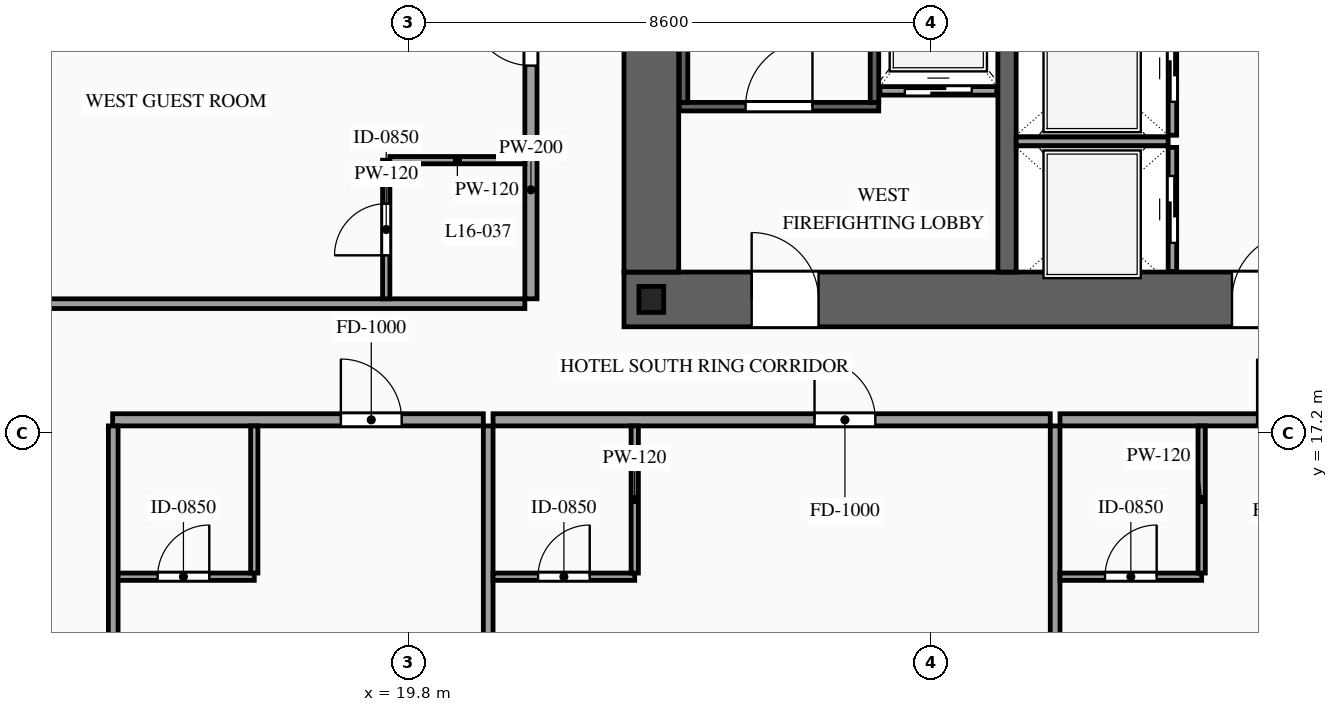
"""IFC4 building model, lengths in metres.
Left out: names, types, materials, properties, quantities, classifications, styles, units other than length and angle.
Written with IfcOpenShell. Run it as: python <this file> out.ifc"""

import sys

from ifc_helpers import new_model, si_unit, direction, frame, frame_2d, origin, origin_2d, place, context, subcontext, project, spatial, rectangle, i_section, extrude, source, transform, mapped, element, fill, save


model = new_model("IFC4")
c1 = context("Model", 3, precision=1e-05, world=origin(), true_north=direction((0.0, 1.0)))
c2 = subcontext(c1, "Body", "Model", "MODEL_VIEW")
j1 = project(units=[si_unit("LENGTHUNIT", "METRE"), si_unit("PLANEANGLEUNIT", "RADIAN")], contexts=[c1])
p1 = place(None, origin())
s1 = spatial("IfcSite", under=j1, at=p1, CompositionType="ELEMENT")
p2 = place(p1, origin())
s2 = spatial("IfcBuilding", under=s1, at=p2, CompositionType="ELEMENT")
p3 = place(p2, frame((0.0, 0.0, 64.0)))
s3 = spatial("IfcBuildingStorey", under=s2, at=p3, CompositionType="ELEMENT", Elevation=64.0)
p4 = place(p3, frame((23.35, 19.4, 0.0), z_axis=(0.0, 0.0, 1.0), x_axis=(1.0, 0.0, 0.0)))
e1 = element("IfcWall", 1, at=p4, inside=s3, PredefinedType="SHEAR", context=c2, shape_type="SweptSolid", body=[
    extrude(rectangle(XDim=27.3, YDim=0.9, at=frame_2d((13.65, 0.0))), origin(), (0.0, 0.0, 1.0), 3.6),
])
p5 = place(p4, frame((2.1, 0.0, 0.0)))
e2 = element("IfcOpeningElement", 2, at=p5, cuts=e1, PredefinedType="OPENING", context=c2, shape_type="SweptSolid", body=[
    extrude(rectangle(XDim=1.1, YDim=2.2, at=frame_2d((0.55, 1.1))), frame((0.0, 0.465, 0.0), z_axis=(0.0, -1.0, 0.0), x_axis=(1.0, 0.0, 0.0)), (0.0, 0.0, 1.0), 0.93),
])
p6 = place(p4, frame((10.0, 0.0, 0.0)))
e3 = element("IfcOpeningElement", 3, at=p6, cuts=e1, PredefinedType="OPENING", context=c2, shape_type="SweptSolid", body=[
    extrude(rectangle(XDim=1.1, YDim=2.2, at=frame_2d((0.55, 1.1))), frame((0.0, 0.465, 0.0), z_axis=(0.0, -1.0, 0.0), x_axis=(1.0, 0.0, 0.0)), (0.0, 0.0, 1.0), 0.93),
])
p7 = place(p4, frame((23.2, 0.0, 0.0)))
e4 = element("IfcOpeningElement", 4, at=p7, cuts=e1, PredefinedType="OPENING", context=c2, shape_type="SweptSolid", body=[
    extrude(rectangle(XDim=1.1, YDim=2.2, at=frame_2d((0.55, 1.1))), frame((0.0, 0.465, 0.0), z_axis=(0.0, -1.0, 0.0), x_axis=(1.0, 0.0, 0.0)), (0.0, 0.0, 1.0), 0.93),
])
p8 = place(p4, frame((19.82, 0.0, 0.0)))
e5 = element("IfcOpeningElement", 5, at=p8, cuts=e1, PredefinedType="OPENING", context=c2, shape_type="SweptSolid", body=[
    extrude(rectangle(XDim=0.9, YDim=2.15, at=frame_2d((0.45, 1.075))), frame((0.0, 0.465, 0.0), z_axis=(0.0, -1.0, 0.0), x_axis=(1.0, 0.0, 0.0)), (0.0, 0.0, 1.0), 0.93),
])
p9 = place(p4, frame((18.38, 0.0, 0.0)))
e6 = element("IfcOpeningElement", 6, at=p9, cuts=e1, PredefinedType="OPENING", context=c2, shape_type="SweptSolid", body=[
    extrude(rectangle(XDim=0.9, YDim=2.15, at=frame_2d((0.45, 1.075))), frame((0.0, 0.465, 0.0), z_axis=(0.0, -1.0, 0.0), x_axis=(1.0, 0.0, 0.0)), (0.0, 0.0, 1.0), 0.93),
])
m1 = source(origin(), c2, "Body", "SweptSolid", [
    extrude(rectangle(XDim=11.9, YDim=0.9, at=frame_2d((5.95, 0.0))), origin(), (0.0, 0.0, 1.0), 3.6),
])
p10 = place(p3, frame((23.8, 19.85, 0.0), z_axis=(0.0, 0.0, 1.0), x_axis=(0.0, 1.0, 0.0)))
e7 = element("IfcWall", 7, at=p10, inside=s3, PredefinedType="SHEAR", context=c2, shape_type="MappedRepresentation", body=[
    mapped(m1, transform((0.0, 0.0, 0.0), scale=1.0)),
])
m2 = source(origin(), c2, "Body", "SweptSolid", [
    extrude(rectangle(XDim=11.9, YDim=0.3, at=frame_2d((5.95, 0.0))), origin(), (0.0, 0.0, 1.0), 3.6),
])
p11 = place(p3, frame((29.65, 19.85, 0.0), z_axis=(0.0, 0.0, 1.0), x_axis=(0.0, 1.0, 0.0)))
e8 = element("IfcWall", 8, at=p11, inside=s3, PredefinedType="SOLIDWALL", context=c2, shape_type="MappedRepresentation", body=[
    mapped(m2, transform((0.0, 0.0, 0.0), scale=1.0)),
])
m3 = source(origin(), c2, "Body", "SweptSolid", [
    extrude(i_section(OverallWidth=0.407, OverallDepth=0.428, WebThickness=0.02, FlangeThickness=0.035, at=origin_2d()), origin(), (0.0, 0.0, 1.0), 3.6),
])
p12 = place(p3, frame((23.8, 19.4, 0.0), z_axis=(0.0, 0.0, 1.0), x_axis=(1.0, 0.0, 0.0)))
e9 = element("IfcColumn", 9, at=p12, inside=s3, PredefinedType="COLUMN", context=c2, shape_type="MappedRepresentation", body=[
    mapped(m3, transform((0.0, 0.0, 0.0), scale=1.0)),
])
p13 = place(p3, frame((27.56, 22.83, 0.0), z_axis=(0.0, 0.0, 1.0), x_axis=(1.0, 0.0, 0.0)))
e10 = element("IfcWall", 10, at=p13, inside=s3, PredefinedType="SOLIDWALL", context=c2, shape_type="SweptSolid", body=[
    extrude(rectangle(XDim=1.92, YDim=0.14, at=frame_2d((0.96, 0.0))), origin(), (0.0, 0.0, 1.0), 3.38),
])
p14 = place(p13, frame((0.41, 0.0, 0.0)))
e11 = element("IfcOpeningElement", 11, at=p14, cuts=e10, PredefinedType="OPENING", context=c2, shape_type="SweptSolid", body=[
    extrude(rectangle(XDim=1.1, YDim=2.2, at=frame_2d((0.55, 1.1))), frame((0.0, 0.085, 0.0), z_axis=(0.0, -1.0, 0.0), x_axis=(1.0, 0.0, 0.0)), (0.0, 0.0, 1.0), 0.17),
])
p15 = place(p3, frame((32.37, 19.86, 0.0), z_axis=(0.0, 0.0, 1.0), x_axis=(0.0, 1.0, 0.0)))
e12 = element("IfcWall", 12, at=p15, inside=s3, PredefinedType="SOLIDWALL", context=c2, shape_type="SweptSolid", body=[
    extrude(rectangle(XDim=2.04, YDim=0.14, at=frame_2d((1.02, 0.0))), origin(), (0.0, 0.0, 1.0), 3.38),
])
p16 = place(p15, frame((0.47, 0.0, 0.0)))
e13 = element("IfcOpeningElement", 13, at=p16, cuts=e12, PredefinedType="OPENING", context=c2, shape_type="SweptSolid", body=[
    extrude(rectangle(XDim=1.1, YDim=2.2, at=frame_2d((0.55, 1.1))), frame((0.0, 0.085, 0.0), z_axis=(0.0, -1.0, 0.0), x_axis=(1.0, 0.0, 0.0)), (0.0, 0.0, 1.0), 0.17),
])
m4 = source(origin(), c2, "Body", "SweptSolid", [
    extrude(rectangle(XDim=2.5, YDim=0.14, at=frame_2d((1.25, 0.0))), origin(), (0.0, 0.0, 1.0), 3.38),
])
p17 = place(p3, frame((29.8, 22.0, 0.0), z_axis=(0.0, 0.0, 1.0), x_axis=(1.0, 0.0, 0.0)))
e14 = element("IfcWall", 14, at=p17, inside=s3, PredefinedType="SOLIDWALL", context=c2, shape_type="MappedRepresentation", body=[
    mapped(m4, transform((0.0, 0.0, 0.0), scale=1.0)),
])
p18 = place(p3, frame((32.37, 22.1, 0.0), z_axis=(0.0, 0.0, 1.0), x_axis=(0.0, 1.0, 0.0)))
e15 = element("IfcWall", 15, at=p18, inside=s3, PredefinedType="SOLIDWALL", context=c2, shape_type="SweptSolid", body=[
    extrude(rectangle(XDim=2.2, YDim=0.14, at=frame_2d((1.1, 0.0))), origin(), (0.0, 0.0, 1.0), 3.38),
])
p19 = place(p18, frame((0.55, 0.0, 0.0)))
e16 = element("IfcOpeningElement", 16, at=p19, cuts=e15, PredefinedType="OPENING", context=c2, shape_type="SweptSolid", body=[
    extrude(rectangle(XDim=1.1, YDim=2.2, at=frame_2d((0.55, 1.1))), frame((0.0, 0.085, 0.0), z_axis=(0.0, -1.0, 0.0), x_axis=(1.0, 0.0, 0.0)), (0.0, 0.0, 1.0), 0.17),
])
p20 = place(p3, frame((24.26, 22.57, 0.0), z_axis=(0.0, 0.0, 1.0), x_axis=(1.0, 0.0, 0.0)))
e17 = element("IfcWall", 17, at=p20, inside=s3, PredefinedType="SOLIDWALL", context=c2, shape_type="SweptSolid", body=[
    extrude(rectangle(XDim=3.28, YDim=0.14, at=frame_2d((1.64, 0.0))), origin(), (0.0, 0.0, 1.0), 3.38),
])
p21 = place(p20, frame((1.09, 0.0, 0.0)))
e18 = element("IfcOpeningElement", 18, at=p21, cuts=e17, PredefinedType="OPENING", context=c2, shape_type="SweptSolid", body=[
    extrude(rectangle(XDim=1.1, YDim=2.2, at=frame_2d((0.55, 1.1))), frame((0.0, 0.085, 0.0), z_axis=(0.0, -1.0, 0.0), x_axis=(1.0, 0.0, 0.0)), (0.0, 0.0, 1.0), 0.17),
])
m5 = source(origin(), c2, "Body", "SweptSolid", [
    extrude(rectangle(XDim=8.94, YDim=0.14, at=frame_2d((4.47, 0.0))), origin(), (0.0, 0.0, 1.0), 3.38),
])
for number, where, z_axis, x_axis in (
    (19, (24.33, 22.64, 0.0), (0.0, 0.0, 1.0), (0.0, 1.0, 0.0)),
    (20, (27.47, 22.64, 0.0), (0.0, 0.0, 1.0), (0.0, 1.0, 0.0)),
):
    element("IfcWall", number, at=place(p3, frame(where, z_axis=z_axis, x_axis=x_axis)), inside=s3, PredefinedType="SOLIDWALL", context=c2, shape_type="MappedRepresentation", body=[
        mapped(m5, transform((0.0, 0.0, 0.0), scale=1.0)),
    ])
p22 = place(p3, frame((14.94, 17.42, 0.0), z_axis=(0.0, 0.0, 1.0), x_axis=(1.0, 0.0, 0.0)))
e21 = element("IfcWall", 21, at=p22, inside=s3, PredefinedType="PARTITIONING", context=c2, shape_type="SweptSolid", body=[
    extrude(rectangle(XDim=6.097, YDim=0.2, at=frame_2d((3.049, 0.0))), origin(), (0.0, 0.0, 1.0), 3.38),
])
p23 = place(p22, frame((3.754, 0.0, 0.0)))
e22 = element("IfcOpeningElement", 22, at=p23, cuts=e21, PredefinedType="OPENING", context=c2, shape_type="SweptSolid", body=[
    extrude(rectangle(XDim=1.0, YDim=2.2, at=frame_2d((0.5, 1.1))), frame((0.0, 0.115, 0.0), z_axis=(0.0, -1.0, 0.0), x_axis=(1.0, 0.0, 0.0)), (0.0, 0.0, 1.0), 0.23),
])
m6 = source(origin(), c2, "Body", "SweptSolid", [
    extrude(rectangle(XDim=16.47, YDim=0.16, at=frame_2d((8.235, 0.0))), origin(), (0.0, 0.0, 1.0), 3.38),
])
p24 = place(p3, frame((21.117, 0.85, 0.0), z_axis=(0.0, 0.0, 1.0), x_axis=(0.0, 1.0, 0.0)))
e23 = element("IfcWall", 23, at=p24, inside=s3, PredefinedType="PARTITIONING", context=c2, shape_type="MappedRepresentation", body=[
    mapped(m6, transform((0.0, 0.0, 0.0), scale=1.0)),
])
p25 = place(p3, frame((14.94, 14.84, 0.0), z_axis=(0.0, 0.0, 1.0), x_axis=(1.0, 0.0, 0.0)))
e24 = element("IfcWall", 24, at=p25, inside=s3, PredefinedType="PARTITIONING", context=c2, shape_type="SweptSolid", body=[
    extrude(rectangle(XDim=2.33, YDim=0.12, at=frame_2d((1.165, 0.0))), origin(), (0.0, 0.0, 1.0), 3.38),
])
p26 = place(p25, frame((0.74, 0.0, 0.0)))
e25 = element("IfcOpeningElement", 25, at=p26, cuts=e24, PredefinedType="OPENING", context=c2, shape_type="SweptSolid", body=[
    extrude(rectangle(XDim=0.85, YDim=2.1, at=frame_2d((0.425, 1.05))), frame((0.0, 0.075, 0.0), z_axis=(0.0, -1.0, 0.0), x_axis=(1.0, 0.0, 0.0)), (0.0, 0.0, 1.0), 0.15),
])
m7 = source(origin(), c2, "Body", "SweptSolid", [
    extrude(rectangle(XDim=2.42, YDim=0.12, at=frame_2d((1.21, 0.0))), origin(), (0.0, 0.0, 1.0), 3.38),
])
p27 = place(p3, frame((17.27, 14.9, 0.0), z_axis=(0.0, 0.0, 1.0), x_axis=(0.0, 1.0, 0.0)))
e26 = element("IfcWall", 26, at=p27, inside=s3, PredefinedType="PARTITIONING", context=c2, shape_type="MappedRepresentation", body=[
    mapped(m7, transform((0.0, 0.0, 0.0), scale=1.0)),
])
p28 = place(p3, frame((21.197, 17.42, 0.0), z_axis=(0.0, 0.0, 1.0), x_axis=(1.0, 0.0, 0.0)))
e27 = element("IfcWall", 27, at=p28, inside=s3, PredefinedType="PARTITIONING", context=c2, shape_type="SweptSolid", body=[
    extrude(rectangle(XDim=9.164, YDim=0.2, at=frame_2d((4.582, 0.0))), origin(), (0.0, 0.0, 1.0), 3.38),
])
p29 = place(p28, frame((5.287, 0.0, 0.0)))
e28 = element("IfcOpeningElement", 28, at=p29, cuts=e27, PredefinedType="OPENING", context=c2, shape_type="SweptSolid", body=[
    extrude(rectangle(XDim=1.0, YDim=2.2, at=frame_2d((0.5, 1.1))), frame((0.0, 0.115, 0.0), z_axis=(0.0, -1.0, 0.0), x_axis=(1.0, 0.0, 0.0)), (0.0, 0.0, 1.0), 0.23),
])
p30 = place(p3, frame((30.441, 0.85, 0.0), z_axis=(0.0, 0.0, 1.0), x_axis=(0.0, 1.0, 0.0)))
e29 = element("IfcWall", 29, at=p30, inside=s3, PredefinedType="PARTITIONING", context=c2, shape_type="MappedRepresentation", body=[
    mapped(m6, transform((0.0, 0.0, 0.0), scale=1.0)),
])
p31 = place(p3, frame((21.197, 14.84, 0.0), z_axis=(0.0, 0.0, 1.0), x_axis=(1.0, 0.0, 0.0)))
e30 = element("IfcWall", 30, at=p31, inside=s3, PredefinedType="PARTITIONING", context=c2, shape_type="SweptSolid", body=[
    extrude(rectangle(XDim=2.33, YDim=0.12, at=frame_2d((1.165, 0.0))), origin(), (0.0, 0.0, 1.0), 3.38),
])
p32 = place(p31, frame((0.74, 0.0, 0.0)))
e31 = element("IfcOpeningElement", 31, at=p32, cuts=e30, PredefinedType="OPENING", context=c2, shape_type="SweptSolid", body=[
    extrude(rectangle(XDim=0.85, YDim=2.1, at=frame_2d((0.425, 1.05))), frame((0.0, 0.075, 0.0), z_axis=(0.0, -1.0, 0.0), x_axis=(1.0, 0.0, 0.0)), (0.0, 0.0, 1.0), 0.15),
])
p33 = place(p3, frame((23.527, 14.9, 0.0), z_axis=(0.0, 0.0, 1.0), x_axis=(0.0, 1.0, 0.0)))
e32 = element("IfcWall", 32, at=p33, inside=s3, PredefinedType="PARTITIONING", context=c2, shape_type="MappedRepresentation", body=[
    mapped(m7, transform((0.0, 0.0, 0.0), scale=1.0)),
])
p34 = place(p3, frame((30.521, 17.42, 0.0), z_axis=(0.0, 0.0, 1.0), x_axis=(1.0, 0.0, 0.0)))
e33 = element("IfcWall", 33, at=p34, inside=s3, PredefinedType="PARTITIONING", context=c2, shape_type="SweptSolid", body=[
    extrude(rectangle(XDim=5.075, YDim=0.2, at=frame_2d((2.538, 0.0))), origin(), (0.0, 0.0, 1.0), 3.38),
])
p35 = place(p34, frame((3.242, 0.0, 0.0)))
e34 = element("IfcOpeningElement", 34, at=p35, cuts=e33, PredefinedType="OPENING", context=c2, shape_type="SweptSolid", body=[
    extrude(rectangle(XDim=1.0, YDim=2.2, at=frame_2d((0.5, 1.1))), frame((0.0, 0.115, 0.0), z_axis=(0.0, -1.0, 0.0), x_axis=(1.0, 0.0, 0.0)), (0.0, 0.0, 1.0), 0.23),
])
p36 = place(p3, frame((30.521, 14.84, 0.0), z_axis=(0.0, 0.0, 1.0), x_axis=(1.0, 0.0, 0.0)))
e35 = element("IfcWall", 35, at=p36, inside=s3, PredefinedType="PARTITIONING", context=c2, shape_type="SweptSolid", body=[
    extrude(rectangle(XDim=2.33, YDim=0.12, at=frame_2d((1.165, 0.0))), origin(), (0.0, 0.0, 1.0), 3.38),
])
p37 = place(p36, frame((0.74, 0.0, 0.0)))
e36 = element("IfcOpeningElement", 36, at=p37, cuts=e35, PredefinedType="OPENING", context=c2, shape_type="SweptSolid", body=[
    extrude(rectangle(XDim=0.85, YDim=2.1, at=frame_2d((0.425, 1.05))), frame((0.0, 0.075, 0.0), z_axis=(0.0, -1.0, 0.0), x_axis=(1.0, 0.0, 0.0)), (0.0, 0.0, 1.0), 0.15),
])
p38 = place(p3, frame((32.851, 14.9, 0.0), z_axis=(0.0, 0.0, 1.0), x_axis=(0.0, 1.0, 0.0)))
e37 = element("IfcWall", 37, at=p38, inside=s3, PredefinedType="PARTITIONING", context=c2, shape_type="MappedRepresentation", body=[
    mapped(m7, transform((0.0, 0.0, 0.0), scale=1.0)),
])
m8 = source(origin(), c2, "Body", "SweptSolid", [
    extrude(rectangle(XDim=16.32, YDim=0.16, at=frame_2d((8.16, 0.0))), origin(), (0.0, 0.0, 1.0), 3.38),
])
p39 = place(p3, frame((14.95, 1.0, 0.0), z_axis=(0.0, 0.0, 1.0), x_axis=(0.0, 1.0, 0.0)))
e38 = element("IfcWall", 38, at=p39, inside=s3, PredefinedType="PARTITIONING", context=c2, shape_type="MappedRepresentation", body=[
    mapped(m8, transform((0.0, 0.0, 0.0), scale=1.0)),
])
p40 = place(p3, frame((21.82, 19.41, 0.0), z_axis=(0.0, 0.0, 1.0), x_axis=(0.0, 1.0, 0.0)))
e39 = element("IfcWall", 39, at=p40, inside=s3, PredefinedType="PARTITIONING", context=c2, shape_type="SweptSolid", body=[
    extrude(rectangle(XDim=6.31, YDim=0.2, at=frame_2d((3.155, 0.0))), origin(), (0.0, 0.0, 1.0), 3.38),
])
p41 = place(p40, frame((3.835, 0.0, 0.0)))
e40 = element("IfcOpeningElement", 40, at=p41, cuts=e39, PredefinedType="OPENING", context=c2, shape_type="SweptSolid", body=[
    extrude(rectangle(XDim=1.0, YDim=2.2, at=frame_2d((0.5, 1.1))), frame((0.0, 0.115, 0.0), z_axis=(0.0, -1.0, 0.0), x_axis=(1.0, 0.0, 0.0)), (0.0, 0.0, 1.0), 0.23),
])
m9 = source(origin(), c2, "Body", "SweptSolid", [
    extrude(rectangle(XDim=9.67, YDim=0.16, at=frame_2d((4.835, 0.0))), origin(), (0.0, 0.0, 1.0), 2.875),
])
p42 = place(p3, frame((12.05, 19.33, 0.0), z_axis=(0.0, 0.0, 1.0), x_axis=(1.0, 0.0, 0.0)))
e41 = element("IfcWall", 41, at=p42, inside=s3, PredefinedType="PARTITIONING", context=c2, shape_type="MappedRepresentation", body=[
    mapped(m9, transform((0.0, 0.0, 0.0), scale=1.0)),
])
p43 = place(p3, frame((19.44, 19.41, 0.0), z_axis=(0.0, 0.0, 1.0), x_axis=(0.0, 1.0, 0.0)))
e42 = element("IfcWall", 42, at=p43, inside=s3, PredefinedType="PARTITIONING", context=c2, shape_type="SweptSolid", body=[
    extrude(rectangle(XDim=2.28, YDim=0.12, at=frame_2d((1.14, 0.0))), origin(), (0.0, 0.0, 1.0), 3.38),
])
p44 = place(p43, frame((0.715, 0.0, 0.0)))
e43 = element("IfcOpeningElement", 43, at=p44, cuts=e42, PredefinedType="OPENING", context=c2, shape_type="SweptSolid", body=[
    extrude(rectangle(XDim=0.85, YDim=2.1, at=frame_2d((0.425, 1.05))), frame((0.0, 0.075, 0.0), z_axis=(0.0, -1.0, 0.0), x_axis=(1.0, 0.0, 0.0)), (0.0, 0.0, 1.0), 0.15),
])
m10 = source(origin(), c2, "Body", "SweptSolid", [
    extrude(rectangle(XDim=2.22, YDim=0.12, at=frame_2d((1.11, 0.0))), origin(), (0.0, 0.0, 1.0), 3.38),
])
p45 = place(p3, frame((19.5, 21.69, 0.0), z_axis=(0.0, 0.0, 1.0), x_axis=(1.0, 0.0, 0.0)))
e44 = element("IfcWall", 44, at=p45, inside=s3, PredefinedType="PARTITIONING", context=c2, shape_type="MappedRepresentation", body=[
    mapped(m10, transform((0.0, 0.0, 0.0), scale=1.0)),
])
m11 = source(origin(), c2, "Body", "SweptSolid", [
    extrude(rectangle(XDim=1.1, YDim=2.2, at=frame_2d((0.55, 1.1))), frame((0.0, 0.025, 0.0), z_axis=(0.0, -1.0, 0.0), x_axis=(1.0, 0.0, 0.0)), (0.0, 0.0, 1.0), 0.05),
])
p46 = place(p14, origin())
e45 = element("IfcDoor", 45, at=p46, inside=s3, OperationType="SLIDING_TO_LEFT", PredefinedType="DOOR", context=c2, shape_type="MappedRepresentation", body=[
    mapped(m11, transform((0.0, 0.0, 0.0), scale=1.0)),
])
fill(e11, e45)
p47 = place(p16, origin())
e46 = element("IfcDoor", 46, at=p47, inside=s3, OperationType="SLIDING_TO_LEFT", PredefinedType="DOOR", context=c2, shape_type="MappedRepresentation", body=[
    mapped(m11, transform((0.0, 0.0, 0.0), scale=1.0)),
])
fill(e13, e46)
p48 = place(p19, origin())
e47 = element("IfcDoor", 47, at=p48, inside=s3, OperationType="SLIDING_TO_RIGHT", PredefinedType="DOOR", context=c2, shape_type="MappedRepresentation", body=[
    mapped(m11, transform((0.0, 0.0, 0.0), scale=1.0)),
])
fill(e16, e47)
m12 = source(origin(), c2, "Body", "SweptSolid", [
    extrude(rectangle(XDim=1.1, YDim=2.2, at=frame_2d((0.55, 1.1))), frame((0.0, 0.025, 0.0), z_axis=(0.0, -1.0, 0.0), x_axis=(1.0, 0.0, 0.0)), (0.0, 0.0, 1.0), 0.05),
])
p49 = place(p21, origin())
e48 = element("IfcDoor", 48, at=p49, inside=s3, OperationType="SINGLE_SWING_RIGHT", PredefinedType="DOOR", context=c2, shape_type="MappedRepresentation", body=[
    mapped(m12, transform((0.0, 0.0, 0.0), scale=1.0)),
])
fill(e18, e48)
p50 = place(p5, origin())
e49 = element("IfcDoor", 49, at=p50, inside=s3, OperationType="SINGLE_SWING_LEFT", PredefinedType="DOOR", context=c2, shape_type="MappedRepresentation", body=[
    mapped(m12, transform((0.0, 0.0, 0.0), scale=1.0)),
])
fill(e2, e49)
p51 = place(p6, origin())
e50 = element("IfcDoor", 50, at=p51, inside=s3, OperationType="SINGLE_SWING_RIGHT", PredefinedType="DOOR", context=c2, shape_type="MappedRepresentation", body=[
    mapped(m12, transform((0.0, 0.0, 0.0), scale=1.0)),
])
fill(e3, e50)
m13 = source(origin(), c2, "Body", "SweptSolid", [
    extrude(rectangle(XDim=1.0, YDim=2.2, at=frame_2d((0.5, 1.1))), frame((0.0, 0.025, 0.0), z_axis=(0.0, -1.0, 0.0), x_axis=(1.0, 0.0, 0.0)), (0.0, 0.0, 1.0), 0.05),
])
p52 = place(p23, origin())
e51 = element("IfcDoor", 51, at=p52, inside=s3, OperationType="SINGLE_SWING_LEFT", PredefinedType="DOOR", context=c2, shape_type="MappedRepresentation", body=[
    mapped(m13, transform((0.0, 0.0, 0.0), scale=1.0)),
])
fill(e22, e51)
m14 = source(origin(), c2, "Body", "SweptSolid", [
    extrude(rectangle(XDim=0.85, YDim=2.1, at=frame_2d((0.425, 1.05))), frame((0.0, 0.025, 0.0), z_axis=(0.0, -1.0, 0.0), x_axis=(1.0, 0.0, 0.0)), (0.0, 0.0, 1.0), 0.05),
])
p53 = place(p26, origin())
e52 = element("IfcDoor", 52, at=p53, inside=s3, OperationType="SINGLE_SWING_RIGHT", PredefinedType="DOOR", context=c2, shape_type="MappedRepresentation", body=[
    mapped(m14, transform((0.0, 0.0, 0.0), scale=1.0)),
])
fill(e25, e52)
p54 = place(p29, origin())
e53 = element("IfcDoor", 53, at=p54, inside=s3, OperationType="SINGLE_SWING_LEFT", PredefinedType="DOOR", context=c2, shape_type="MappedRepresentation", body=[
    mapped(m13, transform((0.0, 0.0, 0.0), scale=1.0)),
])
fill(e28, e53)
p55 = place(p32, origin())
e54 = element("IfcDoor", 54, at=p55, inside=s3, OperationType="SINGLE_SWING_RIGHT", PredefinedType="DOOR", context=c2, shape_type="MappedRepresentation", body=[
    mapped(m14, transform((0.0, 0.0, 0.0), scale=1.0)),
])
fill(e31, e54)
p56 = place(p35, origin())
e55 = element("IfcDoor", 55, at=p56, inside=s3, OperationType="SINGLE_SWING_LEFT", PredefinedType="DOOR", context=c2, shape_type="MappedRepresentation", body=[
    mapped(m13, transform((0.0, 0.0, 0.0), scale=1.0)),
])
fill(e34, e55)
p57 = place(p37, origin())
e56 = element("IfcDoor", 56, at=p57, inside=s3, OperationType="SINGLE_SWING_RIGHT", PredefinedType="DOOR", context=c2, shape_type="MappedRepresentation", body=[
    mapped(m14, transform((0.0, 0.0, 0.0), scale=1.0)),
])
fill(e36, e56)
p58 = place(p41, origin())
e57 = element("IfcDoor", 57, at=p58, inside=s3, OperationType="SINGLE_SWING_RIGHT", PredefinedType="DOOR", context=c2, shape_type="MappedRepresentation", body=[
    mapped(m13, transform((0.0, 0.0, 0.0), scale=1.0)),
])
fill(e40, e57)
p59 = place(p44, origin())
e58 = element("IfcDoor", 58, at=p59, inside=s3, OperationType="SINGLE_SWING_LEFT", PredefinedType="DOOR", context=c2, shape_type="MappedRepresentation", body=[
    mapped(m14, transform((0.0, 0.0, 0.0), scale=1.0)),
])
fill(e43, e58)
save(model, sys.argv[1])
